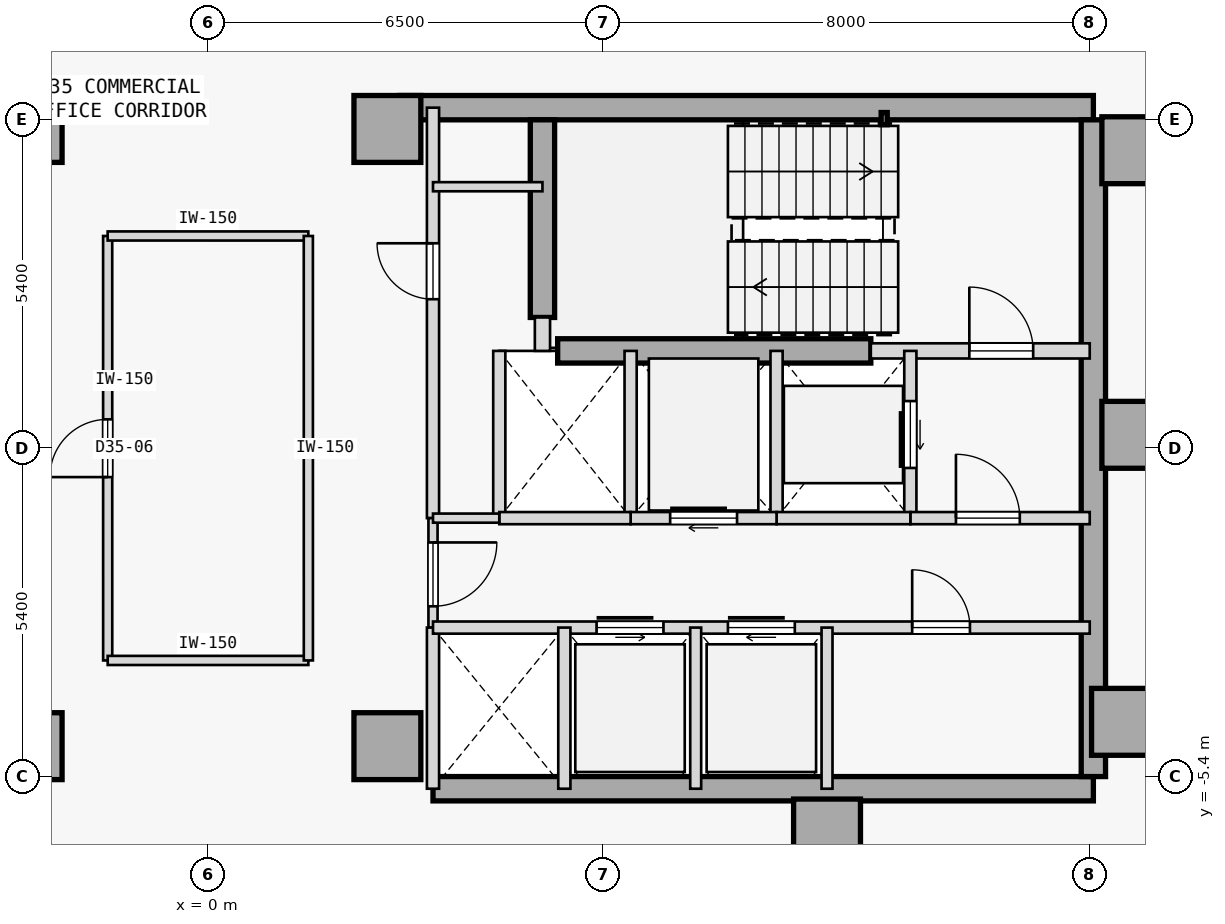
"""IFC4 building model, lengths in metres.
Left out: names, types, materials, properties, quantities, classifications, styles, units other than length and angle.
Written with IfcOpenShell. Run it as: python <this file> out.ifc"""

import sys

from ifc_helpers import new_model, si_unit, direction, frame, frame_2d, origin, origin_2d, place, context, subcontext, project, spatial, rectangle, hollow_rectangle, extrude, element, fill, save


model = new_model("IFC4")
c1 = context("Model", 3, precision=1e-05, world=origin(), true_north=direction((0.0, 1.0)))
c2 = subcontext(c1, "Body", "Model", "MODEL_VIEW")
j1 = project(units=[si_unit("LENGTHUNIT", "METRE"), si_unit("PLANEANGLEUNIT", "RADIAN")], contexts=[c1])
p1 = place(None, origin())
s1 = spatial("IfcSite", under=j1, at=p1, CompositionType="ELEMENT")
p2 = place(p1, origin())
s2 = spatial("IfcBuilding", under=s1, at=p2, CompositionType="ELEMENT")
p3 = place(p2, frame((0.0, 0.0, 139.2)))
s3 = spatial("IfcBuildingStorey", under=s2, at=p3, CompositionType="ELEMENT", Elevation=139.2)
for number, where, z_axis, x_axis in (
    (1, (-2.95, -4.9, 0.0), (0.0, 0.0, 1.0), (1.0, 0.0, 0.0)),
    (2, (-2.95, 5.25, 0.0), (0.0, 0.0, 1.0), (1.0, 0.0, 0.0)),
    (3, (15.25, 4.9, 0.0), (0.0, 0.0, 1.0), (1.0, 0.0, 0.0)),
    (4, (15.25, 0.22, 0.0), (0.0, 0.0, 1.0), (1.0, 0.0, 0.0)),
    (5, (15.08, -4.5, 0.0), (0.0, 0.0, 1.0), (1.0, 0.0, 0.0)),
    (6, (10.18, -6.32, 0.0), (0.0, 0.0, 1.0), (1.0, 0.0, 0.0)),
    (7, (2.95, -4.9, 0.0), (0.0, 0.0, 1.0), (1.0, 0.0, 0.0)),
    (8, (2.95, 5.25, 0.0), (0.0, 0.0, 1.0), (1.0, 0.0, 0.0)),
):
    element("IfcColumn", number, at=place(p3, frame(where, z_axis=z_axis, x_axis=x_axis)), inside=s3, PredefinedType="COLUMN", context=c2, shape_type="SweptSolid", body=[
        extrude(rectangle(XDim=1.1, YDim=1.1, at=origin_2d()), origin(), (0.0, 0.0, 1.0), 3.7),
    ])
p4 = place(p3, frame((3.15, 5.6, 0.0), z_axis=(0.0, 0.0, 1.0), x_axis=(1.0, 0.0, 0.0)))
e9 = element("IfcWall", 9, at=p4, inside=s3, PredefinedType="SHEAR", context=c2, shape_type="SweptSolid", body=[
    extrude(rectangle(XDim=11.41, YDim=0.4, at=frame_2d((5.705, 0.0))), origin(), (0.0, 0.0, 1.0), 3.3),
])
p5 = place(p3, frame((3.7, -5.6, 0.0), z_axis=(0.0, 0.0, 1.0), x_axis=(1.0, 0.0, 0.0)))
e10 = element("IfcWall", 10, at=p5, inside=s3, PredefinedType="SHEAR", context=c2, shape_type="SweptSolid", body=[
    extrude(rectangle(XDim=10.86, YDim=0.4, at=frame_2d((5.43, 0.0))), origin(), (0.0, 0.0, 1.0), 3.3),
])
p6 = place(p3, frame((14.56, -5.4, 0.0), z_axis=(0.0, 0.0, 1.0), x_axis=(0.0, 1.0, 0.0)))
e11 = element("IfcWall", 11, at=p6, inside=s3, PredefinedType="SHEAR", context=c2, shape_type="SweptSolid", body=[
    extrude(rectangle(XDim=10.8, YDim=0.4, at=frame_2d((5.4, 0.0))), origin(), (0.0, 0.0, 1.0), 3.3),
])
p7 = place(p3, frame((5.5, 2.15, 0.0), z_axis=(0.0, 0.0, 1.0), x_axis=(0.0, 1.0, 0.0)))
e12 = element("IfcWall", 12, at=p7, inside=s3, PredefinedType="SHEAR", context=c2, shape_type="SweptSolid", body=[
    extrude(rectangle(XDim=3.25, YDim=0.4, at=frame_2d((1.625, 0.0))), origin(), (0.0, 0.0, 1.0), 3.3),
])
p8 = place(p3, frame((5.75, 1.6, 0.0), z_axis=(0.0, 0.0, 1.0), x_axis=(1.0, 0.0, 0.0)))
e13 = element("IfcWall", 13, at=p8, inside=s3, PredefinedType="SHEAR", context=c2, shape_type="SweptSolid", body=[
    extrude(rectangle(XDim=5.15, YDim=0.4, at=frame_2d((2.575, 0.0))), origin(), (0.0, 0.0, 1.0), 3.3),
])
p9 = place(p3, frame((11.12, 5.42, 0.0), z_axis=(0.0, 0.0, 1.0), x_axis=(1.0, 0.0, 0.0)))
e14 = element("IfcColumn", 14, at=p9, inside=s3, PredefinedType="COLUMN", context=c2, shape_type="SweptSolid", body=[
    extrude(hollow_rectangle(XDim=0.1, YDim=0.2, WallThickness=0.008, at=origin_2d()), origin(), (0.0, 0.0, 1.0), 3.7),
])
p10 = place(p3, frame((10.9, 1.6, 0.0), z_axis=(0.0, 0.0, 1.0), x_axis=(1.0, 0.0, 0.0)))
e15 = element("IfcWall", 15, at=p10, inside=s3, PredefinedType="STANDARD", context=c2, shape_type="SweptSolid", body=[
    extrude(rectangle(XDim=3.6, YDim=0.25, at=frame_2d((1.8, 0.0))), origin(), (0.0, 0.0, 1.0), 3.3),
])
p11 = place(p10, frame((1.62, 0.0, 0.0)))
e16 = element("IfcOpeningElement", 16, at=p11, cuts=e15, PredefinedType="OPENING", context=c2, shape_type="SweptSolid", body=[
    extrude(rectangle(XDim=1.05, YDim=2.15, at=frame_2d((0.525, 1.075))), frame((0.0, 0.135, 0.0), z_axis=(0.0, -1.0, 0.0), x_axis=(1.0, 0.0, 0.0)), (0.0, 0.0, 1.0), 0.27),
])
p12 = place(p3, frame((5.5, 1.6, 0.0), z_axis=(0.0, 0.0, 1.0), x_axis=(0.0, 1.0, 0.0)))
e17 = element("IfcWall", 17, at=p12, inside=s3, PredefinedType="STANDARD", context=c2, shape_type="SweptSolid", body=[
    extrude(rectangle(XDim=0.55, YDim=0.25, at=frame_2d((0.275, 0.0))), origin(), (0.0, 0.0, 1.0), 3.3),
])
p13 = place(p3, frame((3.7, -1.15, 0.0), z_axis=(0.0, 0.0, 1.0), x_axis=(0.0, 1.0, 0.0)))
e18 = element("IfcWall", 18, at=p13, inside=s3, PredefinedType="STANDARD", context=c2, shape_type="SweptSolid", body=[
    extrude(rectangle(XDim=6.75, YDim=0.2, at=frame_2d((3.375, 0.0))), origin(), (0.0, 0.0, 1.0), 3.3),
])
p14 = place(p13, frame((3.6, 0.0, 0.0)))
e19 = element("IfcOpeningElement", 19, at=p14, cuts=e18, PredefinedType="OPENING", context=c2, shape_type="SweptSolid", body=[
    extrude(rectangle(XDim=0.92, YDim=2.15, at=frame_2d((0.46, 1.075))), frame((0.0, 0.11, 0.0), z_axis=(0.0, -1.0, 0.0), x_axis=(1.0, 0.0, 0.0)), (0.0, 0.0, 1.0), 0.22),
])
p15 = place(p3, frame((3.7, -2.95, 0.0), z_axis=(0.0, 0.0, 1.0), x_axis=(0.0, 1.0, 0.0)))
e20 = element("IfcWall", 20, at=p15, inside=s3, PredefinedType="PARTITIONING", context=c2, shape_type="SweptSolid", body=[
    extrude(rectangle(XDim=1.8, YDim=0.15, at=frame_2d((0.9, 0.0))), origin(), (0.0, 0.0, 1.0), 3.3),
])
p16 = place(p15, frame((0.35, 0.0, 0.0)))
e21 = element("IfcOpeningElement", 21, at=p16, cuts=e20, PredefinedType="OPENING", context=c2, shape_type="SweptSolid", body=[
    extrude(rectangle(XDim=1.05, YDim=2.18, at=frame_2d((0.525, 1.09))), frame((0.0, 0.085, 0.0), z_axis=(0.0, -1.0, 0.0), x_axis=(1.0, 0.0, 0.0)), (0.0, 0.0, 1.0), 0.17),
])
p17 = place(p3, frame((3.7, -5.6, 0.0), z_axis=(0.0, 0.0, 1.0), x_axis=(0.0, 1.0, 0.0)))
e22 = element("IfcWall", 22, at=p17, inside=s3, PredefinedType="STANDARD", context=c2, shape_type="SweptSolid", body=[
    extrude(rectangle(XDim=2.65, YDim=0.2, at=frame_2d((1.325, 0.0))), origin(), (0.0, 0.0, 1.0), 3.3),
])
p18 = place(p3, frame((11.55, -1.15, 0.0), z_axis=(0.0, 0.0, 1.0), x_axis=(0.0, 1.0, 0.0)))
e23 = element("IfcWall", 23, at=p18, inside=s3, PredefinedType="STANDARD", context=c2, shape_type="SweptSolid", body=[
    extrude(rectangle(XDim=2.75, YDim=0.2, at=frame_2d((1.375, 0.0))), origin(), (0.0, 0.0, 1.0), 3.3),
])
p19 = place(p18, frame((0.825, 0.0, 0.0)))
e24 = element("IfcOpeningElement", 24, at=p19, cuts=e23, PredefinedType="OPENING", context=c2, shape_type="SweptSolid", body=[
    extrude(rectangle(XDim=1.1, YDim=2.15, at=frame_2d((0.55, 1.075))), frame((0.0, 0.11, 0.0), z_axis=(0.0, -1.0, 0.0), x_axis=(1.0, 0.0, 0.0)), (0.0, 0.0, 1.0), 0.22),
])
p20 = place(p3, frame((9.35, -1.15, 0.0), z_axis=(0.0, 0.0, 1.0), x_axis=(0.0, 1.0, 0.0)))
e25 = element("IfcWall", 25, at=p20, inside=s3, PredefinedType="STANDARD", context=c2, shape_type="SweptSolid", body=[
    extrude(rectangle(XDim=2.75, YDim=0.2, at=frame_2d((1.375, 0.0))), origin(), (0.0, 0.0, 1.0), 3.3),
])
p21 = place(p3, frame((11.55, -1.15, 0.0), z_axis=(0.0, 0.0, 1.0), x_axis=(1.0, 0.0, 0.0)))
e26 = element("IfcWall", 26, at=p21, inside=s3, PredefinedType="STANDARD", context=c2, shape_type="SweptSolid", body=[
    extrude(rectangle(XDim=2.95, YDim=0.2, at=frame_2d((1.475, 0.0))), origin(), (0.0, 0.0, 1.0), 3.3),
])
p22 = place(p21, frame((0.75, 0.0, 0.0)))
e27 = element("IfcOpeningElement", 27, at=p22, cuts=e26, PredefinedType="OPENING", context=c2, shape_type="SweptSolid", body=[
    extrude(rectangle(XDim=1.05, YDim=2.18, at=frame_2d((0.525, 1.09))), frame((0.0, 0.11, 0.0), z_axis=(0.0, -1.0, 0.0), x_axis=(1.0, 0.0, 0.0)), (0.0, 0.0, 1.0), 0.22),
])
p23 = place(p3, frame((9.35, -1.15, 0.0), z_axis=(0.0, 0.0, 1.0), x_axis=(1.0, 0.0, 0.0)))
e28 = element("IfcWall", 28, at=p23, inside=s3, PredefinedType="STANDARD", context=c2, shape_type="SweptSolid", body=[
    extrude(rectangle(XDim=2.2, YDim=0.2, at=frame_2d((1.1, 0.0))), origin(), (0.0, 0.0, 1.0), 3.3),
])
p24 = place(p3, frame((6.95, -1.15, 0.0), z_axis=(0.0, 0.0, 1.0), x_axis=(0.0, 1.0, 0.0)))
e29 = element("IfcWall", 29, at=p24, inside=s3, PredefinedType="STANDARD", context=c2, shape_type="SweptSolid", body=[
    extrude(rectangle(XDim=2.75, YDim=0.2, at=frame_2d((1.375, 0.0))), origin(), (0.0, 0.0, 1.0), 3.3),
])
p25 = place(p3, frame((6.95, -1.15, 0.0), z_axis=(0.0, 0.0, 1.0), x_axis=(1.0, 0.0, 0.0)))
e30 = element("IfcWall", 30, at=p25, inside=s3, PredefinedType="STANDARD", context=c2, shape_type="SweptSolid", body=[
    extrude(rectangle(XDim=2.4, YDim=0.2, at=frame_2d((1.2, 0.0))), origin(), (0.0, 0.0, 1.0), 3.3),
])
p26 = place(p25, frame((0.65, 0.0, 0.0)))
e31 = element("IfcOpeningElement", 31, at=p26, cuts=e30, PredefinedType="OPENING", context=c2, shape_type="SweptSolid", body=[
    extrude(rectangle(XDim=1.1, YDim=2.15, at=frame_2d((0.55, 1.075))), frame((0.0, 0.11, 0.0), z_axis=(0.0, -1.0, 0.0), x_axis=(1.0, 0.0, 0.0)), (0.0, 0.0, 1.0), 0.22),
])
p27 = place(p3, frame((4.79, -1.15, 0.0), z_axis=(0.0, 0.0, 1.0), x_axis=(0.0, 1.0, 0.0)))
e32 = element("IfcWall", 32, at=p27, inside=s3, PredefinedType="STANDARD", context=c2, shape_type="SweptSolid", body=[
    extrude(rectangle(XDim=2.75, YDim=0.2, at=frame_2d((1.375, 0.0))), origin(), (0.0, 0.0, 1.0), 3.3),
])
p28 = place(p3, frame((4.79, -1.15, 0.0), z_axis=(0.0, 0.0, 1.0), x_axis=(1.0, 0.0, 0.0)))
e33 = element("IfcWall", 33, at=p28, inside=s3, PredefinedType="STANDARD", context=c2, shape_type="SweptSolid", body=[
    extrude(rectangle(XDim=2.16, YDim=0.2, at=frame_2d((1.08, 0.0))), origin(), (0.0, 0.0, 1.0), 3.3),
])
p29 = place(p3, frame((3.7, -1.15, 0.0), z_axis=(0.0, 0.0, 1.0), x_axis=(1.0, 0.0, 0.0)))
e34 = element("IfcWall", 34, at=p29, inside=s3, PredefinedType="PARTITIONING", context=c2, shape_type="SweptSolid", body=[
    extrude(rectangle(XDim=1.09, YDim=0.15, at=frame_2d((0.545, 0.0))), origin(), (0.0, 0.0, 1.0), 3.3),
])
p30 = place(p3, frame((3.7, -2.95, 0.0), z_axis=(0.0, 0.0, 1.0), x_axis=(1.0, 0.0, 0.0)))
e35 = element("IfcWall", 35, at=p30, inside=s3, PredefinedType="STANDARD", context=c2, shape_type="SweptSolid", body=[
    extrude(rectangle(XDim=10.8, YDim=0.2, at=frame_2d((5.4, 0.0))), origin(), (0.0, 0.0, 1.0), 3.3),
])
p31 = place(p30, frame((2.69, 0.0, 0.0)))
e36 = element("IfcOpeningElement", 36, at=p31, cuts=e35, PredefinedType="OPENING", context=c2, shape_type="SweptSolid", body=[
    extrude(rectangle(XDim=1.1, YDim=2.15, at=frame_2d((0.55, 1.075))), frame((0.0, 0.11, 0.0), z_axis=(0.0, -1.0, 0.0), x_axis=(1.0, 0.0, 0.0)), (0.0, 0.0, 1.0), 0.22),
])
p32 = place(p30, frame((4.85, 0.0, 0.0)))
e37 = element("IfcOpeningElement", 37, at=p32, cuts=e35, PredefinedType="OPENING", context=c2, shape_type="SweptSolid", body=[
    extrude(rectangle(XDim=1.1, YDim=2.15, at=frame_2d((0.55, 1.075))), frame((0.0, 0.11, 0.0), z_axis=(0.0, -1.0, 0.0), x_axis=(1.0, 0.0, 0.0)), (0.0, 0.0, 1.0), 0.22),
])
p33 = place(p30, frame((7.88, 0.0, 0.0)))
e38 = element("IfcOpeningElement", 38, at=p33, cuts=e35, PredefinedType="OPENING", context=c2, shape_type="SweptSolid", body=[
    extrude(rectangle(XDim=0.95, YDim=2.15, at=frame_2d((0.475, 1.075))), frame((0.0, 0.11, 0.0), z_axis=(0.0, -1.0, 0.0), x_axis=(1.0, 0.0, 0.0)), (0.0, 0.0, 1.0), 0.22),
])
p34 = place(p3, frame((5.86, -5.6, 0.0), z_axis=(0.0, 0.0, 1.0), x_axis=(0.0, 1.0, 0.0)))
e39 = element("IfcWall", 39, at=p34, inside=s3, PredefinedType="STANDARD", context=c2, shape_type="SweptSolid", body=[
    extrude(rectangle(XDim=2.65, YDim=0.2, at=frame_2d((1.325, 0.0))), origin(), (0.0, 0.0, 1.0), 3.3),
])
for number, where, z_axis, x_axis in (
    (40, (10.18, -5.6, 0.0), (0.0, 0.0, 1.0), (0.0, 1.0, 0.0)),
    (41, (8.02, -5.6, 0.0), (0.0, 0.0, 1.0), (0.0, 1.0, 0.0)),
):
    element("IfcWall", number, at=place(p3, frame(where, z_axis=z_axis, x_axis=x_axis)), inside=s3, PredefinedType="STANDARD", context=c2, shape_type="SweptSolid", body=[
        extrude(rectangle(XDim=2.65, YDim=0.18, at=frame_2d((1.325, 0.0))), origin(), (0.0, 0.0, 1.0), 3.3),
    ])
p35 = place(p3, frame((3.7, 4.3, 0.0), z_axis=(0.0, 0.0, 1.0), x_axis=(1.0, 0.0, 0.0)))
e42 = element("IfcWall", 42, at=p35, inside=s3, PredefinedType="PARTITIONING", context=c2, shape_type="SweptSolid", body=[
    extrude(rectangle(XDim=1.8, YDim=0.15, at=frame_2d((0.9, 0.0))), origin(), (0.0, 0.0, 1.0), 3.3),
])
p36 = place(p3, frame((-1.65, -3.49, 0.0), z_axis=(0.0, 0.0, 1.0), x_axis=(-0.000104928124, 0.999999994495, 0.0)))
e43 = element("IfcWall", 43, at=p36, inside=s3, PredefinedType="PARTITIONING", context=c2, shape_type="SweptSolid", body=[
    extrude(rectangle(XDim=6.98, YDim=0.15, at=frame_2d((3.49, 0.0))), origin(), (0.0, 0.0, 1.0), 3.3),
])
p37 = place(p36, frame((3.015, 0.0, 0.0)))
e44 = element("IfcOpeningElement", 44, at=p37, cuts=e43, PredefinedType="OPENING", context=c2, shape_type="SweptSolid", body=[
    extrude(rectangle(XDim=0.95, YDim=2.15, at=frame_2d((0.475, 1.075))), frame((0.0, 0.085, 0.0), z_axis=(0.0, -1.0, 0.0), x_axis=(1.0, 0.0, 0.0)), (0.0, 0.0, 1.0), 0.17),
])
p38 = place(p3, frame((-1.65, -3.49, 0.0), z_axis=(0.0, 0.0, 1.0), x_axis=(1.0, 0.0, 0.0)))
e45 = element("IfcWall", 45, at=p38, inside=s3, PredefinedType="PARTITIONING", context=c2, shape_type="SweptSolid", body=[
    extrude(rectangle(XDim=3.3, YDim=0.15, at=frame_2d((1.65, 0.0))), origin(), (0.0, 0.0, 1.0), 3.3),
])
p39 = place(p3, frame((-1.65, 3.49, 0.0), z_axis=(0.0, 0.0, 1.0), x_axis=(1.0, 0.0, 0.0)))
e46 = element("IfcWall", 46, at=p39, inside=s3, PredefinedType="PARTITIONING", context=c2, shape_type="SweptSolid", body=[
    extrude(rectangle(XDim=3.3, YDim=0.15, at=frame_2d((1.65, 0.0))), origin(), (0.0, 0.0, 1.0), 3.3),
])
p40 = place(p3, frame((1.65, -3.49, 0.0), z_axis=(0.0, 0.0, 1.0), x_axis=(-6.9952083e-05, 0.999999997553, 0.0)))
e47 = element("IfcWall", 47, at=p40, inside=s3, PredefinedType="PARTITIONING", context=c2, shape_type="SweptSolid", body=[
    extrude(rectangle(XDim=6.98, YDim=0.15, at=frame_2d((3.49, 0.0))), origin(), (0.0, 0.0, 1.0), 3.3),
])
p41 = place(p11, origin())
e48 = element("IfcDoor", 48, at=p41, inside=s3, OperationType="SINGLE_SWING_LEFT", PredefinedType="DOOR", context=c2, shape_type="SweptSolid", body=[
    extrude(rectangle(XDim=1.05, YDim=2.15, at=frame_2d((0.525, 1.075))), frame((0.0, 0.025, 0.0), z_axis=(0.0, -1.0, 0.0), x_axis=(1.0, 0.0, 0.0)), (0.0, 0.0, 1.0), 0.05),
])
fill(e16, e48)
p42 = place(p22, origin())
e49 = element("IfcDoor", 49, at=p42, inside=s3, OperationType="SINGLE_SWING_LEFT", PredefinedType="DOOR", context=c2, shape_type="SweptSolid", body=[
    extrude(rectangle(XDim=1.05, YDim=2.18, at=frame_2d((0.525, 1.09))), frame((0.0, 0.025, 0.0), z_axis=(0.0, -1.0, 0.0), x_axis=(1.0, 0.0, 0.0)), (0.0, 0.0, 1.0), 0.05),
])
fill(e27, e49)
p43 = place(p16, frame((1.05, 0.0, 0.0), z_axis=(0.0, 0.0, 1.0), x_axis=(-1.0, 0.0, 0.0)))
e50 = element("IfcDoor", 50, at=p43, inside=s3, OperationType="SINGLE_SWING_RIGHT", PredefinedType="DOOR", context=c2, shape_type="SweptSolid", body=[
    extrude(rectangle(XDim=1.05, YDim=2.18, at=frame_2d((0.525, 1.09))), frame((0.0, 0.025, 0.0), z_axis=(0.0, -1.0, 0.0), x_axis=(1.0, 0.0, 0.0)), (0.0, 0.0, 1.0), 0.05),
])
fill(e21, e50)
p44 = place(p19, origin())
e51 = element("IfcDoor", 51, at=p44, inside=s3, OperationType="SLIDING_TO_RIGHT", PredefinedType="DOOR", context=c2, shape_type="SweptSolid", body=[
    extrude(rectangle(XDim=1.1, YDim=2.15, at=frame_2d((0.55, 1.075))), frame((0.0, 0.025, 0.0), z_axis=(0.0, -1.0, 0.0), x_axis=(1.0, 0.0, 0.0)), (0.0, 0.0, 1.0), 0.05),
])
fill(e24, e51)
p45 = place(p26, origin())
e52 = element("IfcDoor", 52, at=p45, inside=s3, OperationType="SLIDING_TO_RIGHT", PredefinedType="DOOR", context=c2, shape_type="SweptSolid", body=[
    extrude(rectangle(XDim=1.1, YDim=2.15, at=frame_2d((0.55, 1.075))), frame((0.0, 0.025, 0.0), z_axis=(0.0, -1.0, 0.0), x_axis=(1.0, 0.0, 0.0)), (0.0, 0.0, 1.0), 0.05),
])
fill(e31, e52)
p46 = place(p31, origin())
e53 = element("IfcDoor", 53, at=p46, inside=s3, OperationType="SLIDING_TO_LEFT", PredefinedType="DOOR", context=c2, shape_type="SweptSolid", body=[
    extrude(rectangle(XDim=1.1, YDim=2.15, at=frame_2d((0.55, 1.075))), frame((0.0, 0.025, 0.0), z_axis=(0.0, -1.0, 0.0), x_axis=(1.0, 0.0, 0.0)), (0.0, 0.0, 1.0), 0.05),
])
fill(e36, e53)
p47 = place(p32, origin())
e54 = element("IfcDoor", 54, at=p47, inside=s3, OperationType="SLIDING_TO_RIGHT", PredefinedType="DOOR", context=c2, shape_type="SweptSolid", body=[
    extrude(rectangle(XDim=1.1, YDim=2.15, at=frame_2d((0.55, 1.075))), frame((0.0, 0.025, 0.0), z_axis=(0.0, -1.0, 0.0), x_axis=(1.0, 0.0, 0.0)), (0.0, 0.0, 1.0), 0.05),
])
fill(e37, e54)
p48 = place(p33, origin())
e55 = element("IfcDoor", 55, at=p48, inside=s3, OperationType="SINGLE_SWING_LEFT", PredefinedType="DOOR", context=c2, shape_type="SweptSolid", body=[
    extrude(rectangle(XDim=0.95, YDim=2.15, at=frame_2d((0.475, 1.075))), frame((0.0, 0.025, 0.0), z_axis=(0.0, -1.0, 0.0), x_axis=(1.0, 0.0, 0.0)), (0.0, 0.0, 1.0), 0.05),
])
fill(e38, e55)
p49 = place(p14, origin())
e56 = element("IfcDoor", 56, at=p49, inside=s3, OperationType="SINGLE_SWING_RIGHT", PredefinedType="DOOR", context=c2, shape_type="SweptSolid", body=[
    extrude(rectangle(XDim=0.92, YDim=2.15, at=frame_2d((0.46, 1.075))), frame((0.0, 0.025, 0.0), z_axis=(0.0, -1.0, 0.0), x_axis=(1.0, 0.0, 0.0)), (0.0, 0.0, 1.0), 0.05),
])
fill(e19, e56)
p50 = place(p37, origin())
e57 = element("IfcDoor", 57, at=p50, inside=s3, OperationType="SINGLE_SWING_LEFT", PredefinedType="DOOR", context=c2, shape_type="SweptSolid", body=[
    extrude(rectangle(XDim=0.95, YDim=2.15, at=frame_2d((0.475, 1.075))), frame((0.0, 0.025, 0.0), z_axis=(0.0, -1.0, 0.0), x_axis=(1.0, 0.0, 0.0)), (0.0, 0.0, 1.0), 0.05),
])
fill(e44, e57)
save(model, sys.argv[1])
